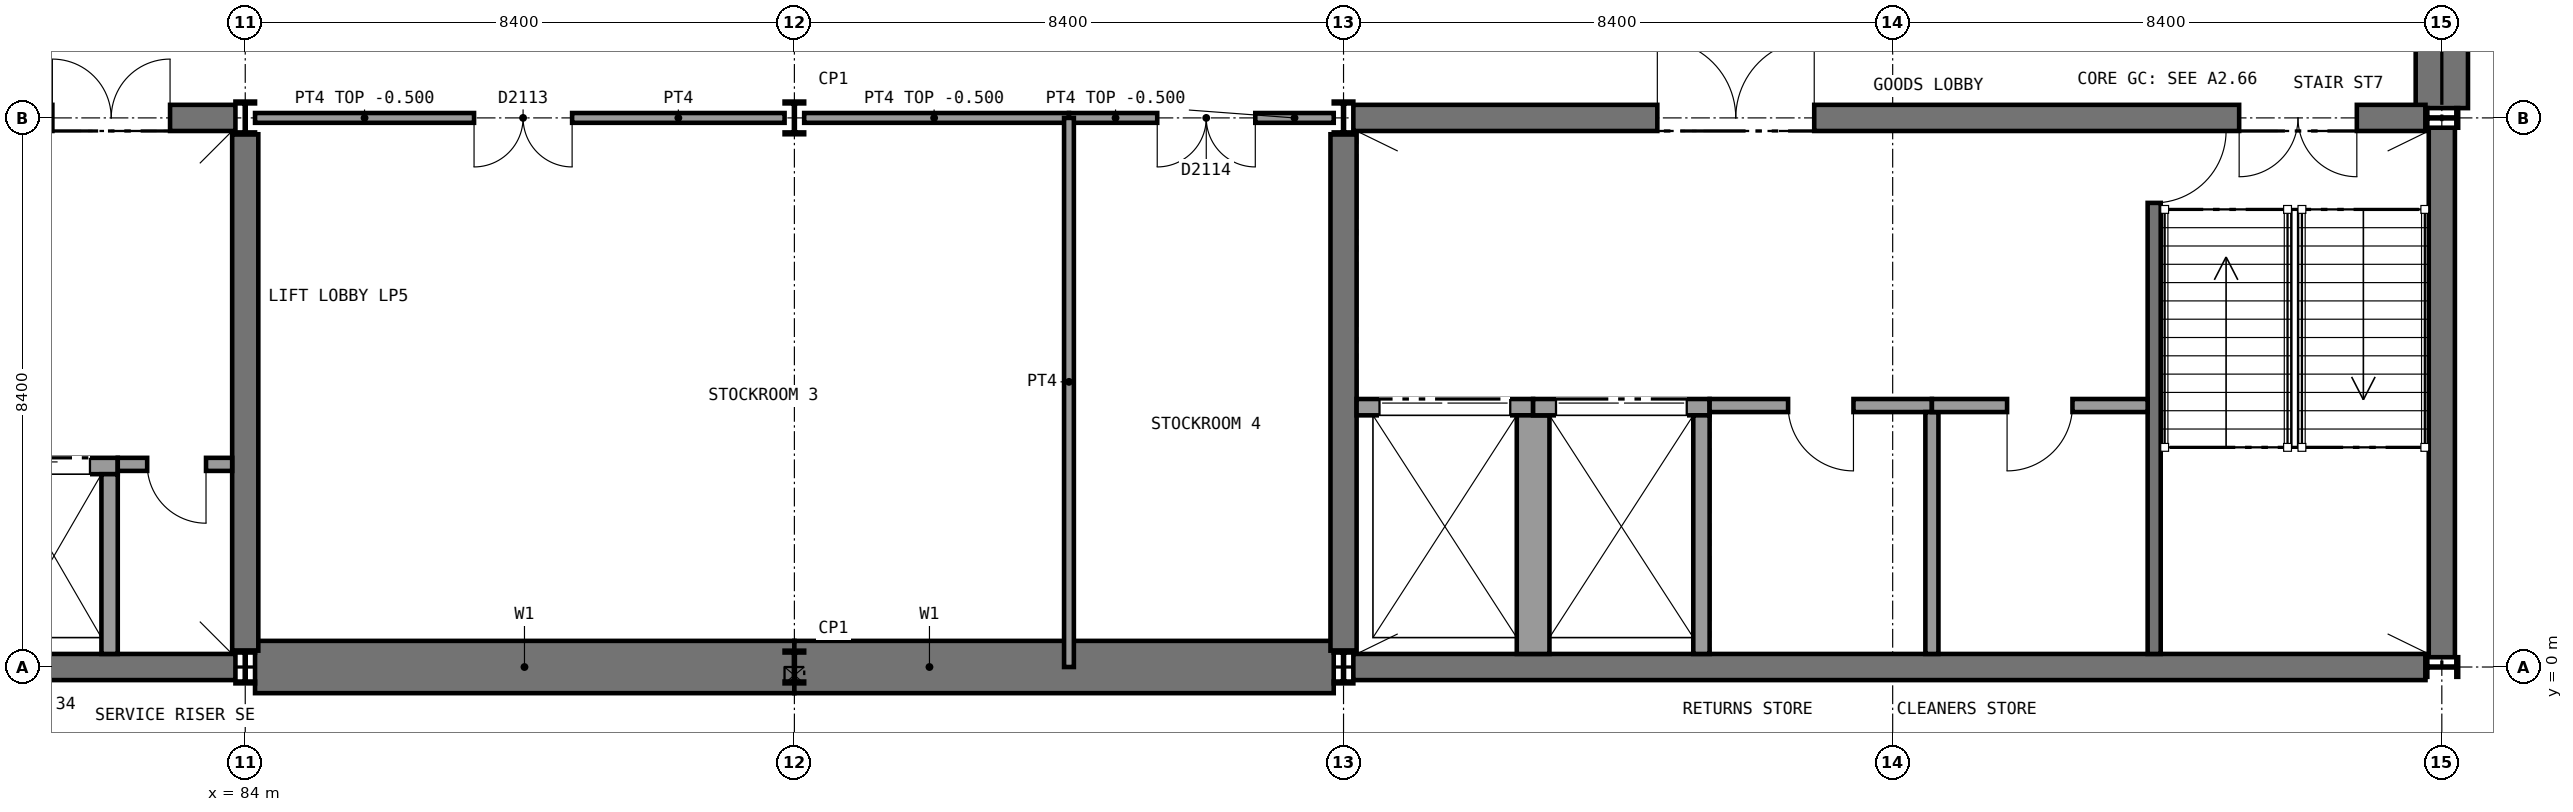
"""IFC4 building model, lengths in metres.
Left out: names, types, materials, properties, quantities, classifications, styles, units other than length and angle.
Written with IfcOpenShell. Run it as: python <this file> out.ifc"""

import sys

from ifc_helpers import new_model, si_unit, direction, frame, frame_2d, origin, origin_2d, place, context, subcontext, project, spatial, rectangle, i_section, extrude, element, fill, save


model = new_model("IFC4")
c1 = context("Model", 3, precision=1e-05, world=origin(), true_north=direction((0.0, 1.0)))
c2 = subcontext(c1, "Body", "Model", "MODEL_VIEW")
j1 = project(units=[si_unit("LENGTHUNIT", "METRE"), si_unit("PLANEANGLEUNIT", "RADIAN")], contexts=[c1])
p1 = place(None, origin())
s1 = spatial("IfcSite", under=j1, at=p1, CompositionType="ELEMENT")
p2 = place(p1, origin())
s2 = spatial("IfcBuilding", under=s1, at=p2, CompositionType="ELEMENT")
p3 = place(p2, frame((0.0, 0.0, -4.9)))
s3 = spatial("IfcBuildingStorey", under=s2, at=p3, CompositionType="ELEMENT", Elevation=-4.9)
p4 = place(p3, frame((84.15, 0.0, 0.0), z_axis=(0.0, 0.0, 1.0), x_axis=(1.0, 0.0, 0.0)))
e1 = element("IfcWall", 1, at=p4, inside=s3, PredefinedType="SOLIDWALL", context=c2, shape_type="SweptSolid", body=[
    extrude(rectangle(XDim=8.25, YDim=0.8, at=frame_2d((4.125, 0.0))), origin(), (0.0, 0.0, 1.0), 4.75),
])
p5 = place(p3, frame((92.4, 0.0, 0.0), z_axis=(0.0, 0.0, 1.0), x_axis=(1.0, 0.0, 0.0)))
e2 = element("IfcWall", 2, at=p5, inside=s3, PredefinedType="SOLIDWALL", context=c2, shape_type="SweptSolid", body=[
    extrude(rectangle(XDim=8.25, YDim=0.8, at=frame_2d((4.125, 0.0))), origin(), (0.0, 0.0, 1.0), 4.75),
])
p6 = place(p3, frame((117.6, 8.55, 0.0), z_axis=(0.0, 0.0, 1.0), x_axis=(0.0, 1.0, 0.0)))
e3 = element("IfcWall", 3, at=p6, inside=s3, PredefinedType="SOLIDWALL", context=c2, shape_type="SweptSolid", body=[
    extrude(rectangle(XDim=8.25, YDim=0.8, at=frame_2d((4.125, 0.0))), origin(), (0.0, 0.0, 1.0), 4.6),
])
p7 = place(p3, frame((75.75, 0.0, 0.0), z_axis=(0.0, 0.0, 1.0), x_axis=(1.0, 0.0, 0.0)))
e4 = element("IfcWall", 4, at=p7, inside=s3, PredefinedType="SHEAR", context=c2, shape_type="SweptSolid", body=[
    extrude(rectangle(XDim=8.1, YDim=0.4, at=frame_2d((4.05, 0.0))), origin(), (0.0, 0.0, 1.0), 4.75),
])
p8 = place(p3, frame((75.75, 8.4, 0.0), z_axis=(0.0, 0.0, 1.0), x_axis=(1.0, 0.0, 0.0)))
e5 = element("IfcWall", 5, at=p8, inside=s3, PredefinedType="SHEAR", context=c2, shape_type="SweptSolid", body=[
    extrude(rectangle(XDim=8.1, YDim=0.4, at=frame_2d((4.05, 0.0))), origin(), (0.0, 0.0, 1.0), 4.75),
])
p9 = place(p8, frame((1.15, 0.0, 0.0)))
e6 = element("IfcOpeningElement", 6, at=p9, cuts=e5, PredefinedType="OPENING", context=c2, shape_type="SweptSolid", body=[
    extrude(rectangle(XDim=1.8, YDim=2.1, at=frame_2d((0.9, 1.05))), frame((0.0, 0.21, 0.0), z_axis=(0.0, -1.0, 0.0), x_axis=(1.0, 0.0, 0.0)), (0.0, 0.0, 1.0), 0.42),
])
p10 = place(p8, frame((5.3, 0.0, 0.0)))
e7 = element("IfcOpeningElement", 7, at=p10, cuts=e5, PredefinedType="OPENING", context=c2, shape_type="SweptSolid", body=[
    extrude(rectangle(XDim=1.8, YDim=2.1, at=frame_2d((0.9, 1.05))), frame((0.0, 0.21, 0.0), z_axis=(0.0, -1.0, 0.0), x_axis=(1.0, 0.0, 0.0)), (0.0, 0.0, 1.0), 0.42),
])
p11 = place(p3, frame((84.0, 0.25, 0.0), z_axis=(0.0, 0.0, 1.0), x_axis=(0.0, 1.0, 0.0)))
e8 = element("IfcWall", 8, at=p11, inside=s3, PredefinedType="SHEAR", context=c2, shape_type="SweptSolid", body=[
    extrude(rectangle(XDim=7.9, YDim=0.4, at=frame_2d((3.95, 0.0))), origin(), (0.0, 0.0, 1.0), 4.75),
])
p12 = place(p3, frame((100.95, 0.0, 0.0), z_axis=(0.0, 0.0, 1.0), x_axis=(1.0, 0.0, 0.0)))
e9 = element("IfcWall", 9, at=p12, inside=s3, PredefinedType="SHEAR", context=c2, shape_type="SweptSolid", body=[
    extrude(rectangle(XDim=16.4, YDim=0.4, at=frame_2d((8.2, 0.0))), origin(), (0.0, 0.0, 1.0), 4.75),
])
p13 = place(p3, frame((100.95, 8.4, 0.0), z_axis=(0.0, 0.0, 1.0), x_axis=(1.0, 0.0, 0.0)))
e10 = element("IfcWall", 10, at=p13, inside=s3, PredefinedType="SHEAR", context=c2, shape_type="SweptSolid", body=[
    extrude(rectangle(XDim=16.4, YDim=0.4, at=frame_2d((8.2, 0.0))), origin(), (0.0, 0.0, 1.0), 4.75),
])
p14 = place(p13, frame((13.55, 0.0, 0.0)))
e11 = element("IfcOpeningElement", 11, at=p14, cuts=e10, PredefinedType="OPENING", context=c2, shape_type="SweptSolid", body=[
    extrude(rectangle(XDim=1.8, YDim=2.1, at=frame_2d((0.9, 1.05))), frame((0.0, 0.21, 0.0), z_axis=(0.0, -1.0, 0.0), x_axis=(1.0, 0.0, 0.0)), (0.0, 0.0, 1.0), 0.42),
])
p15 = place(p13, frame((4.65, 0.0, 0.0)))
e12 = element("IfcOpeningElement", 12, at=p15, cuts=e10, PredefinedType="OPENING", context=c2, shape_type="SweptSolid", body=[
    extrude(rectangle(XDim=2.4, YDim=2.4, at=frame_2d((1.2, 1.2))), frame((0.0, 0.21, 0.0), z_axis=(0.0, -1.0, 0.0), x_axis=(1.0, 0.0, 0.0)), (0.0, 0.0, 1.0), 0.42),
])
p16 = place(p3, frame((100.8, 0.25, 0.0), z_axis=(0.0, 0.0, 1.0), x_axis=(0.0, 1.0, 0.0)))
e13 = element("IfcWall", 13, at=p16, inside=s3, PredefinedType="SHEAR", context=c2, shape_type="SweptSolid", body=[
    extrude(rectangle(XDim=7.9, YDim=0.4, at=frame_2d((3.95, 0.0))), origin(), (0.0, 0.0, 1.0), 4.75),
])
p17 = place(p3, frame((117.6, 0.15, 0.0), z_axis=(0.0, 0.0, 1.0), x_axis=(0.0, 1.0, 0.0)))
e14 = element("IfcWall", 14, at=p17, inside=s3, PredefinedType="SHEAR", context=c2, shape_type="SweptSolid", body=[
    extrude(rectangle(XDim=8.1, YDim=0.4, at=frame_2d((4.05, 0.0))), origin(), (0.0, 0.0, 1.0), 4.75),
])
for number, where, z_axis, x_axis in (
    (15, (84.0, 0.0, 0.0), (0.0, 0.0, 1.0), (1.0, 0.0, 0.0)),
    (16, (84.0, 8.4, 0.0), (0.0, 0.0, 1.0), (1.0, 0.0, 0.0)),
    (17, (92.4, 0.0, 0.0), (0.0, 0.0, 1.0), (1.0, 0.0, 0.0)),
    (18, (92.4, 8.4, 0.0), (0.0, 0.0, 1.0), (1.0, 0.0, 0.0)),
    (19, (100.8, 0.0, 0.0), (0.0, 0.0, 1.0), (1.0, 0.0, 0.0)),
    (20, (100.8, 8.4, 0.0), (0.0, 0.0, 1.0), (1.0, 0.0, 0.0)),
    (21, (117.6, 0.0, 0.0), (0.0, 0.0, 1.0), (0.0, 1.0, 0.0)),
    (22, (117.6, 8.4, 0.0), (0.0, 0.0, 1.0), (0.0, 1.0, 0.0)),
):
    element("IfcColumn", number, at=place(p3, frame(where, z_axis=z_axis, x_axis=x_axis)), inside=s3, PredefinedType="COLUMN", context=c2, shape_type="SweptSolid", body=[
        extrude(i_section(OverallWidth=0.3, OverallDepth=0.5, WebThickness=0.014, FlangeThickness=0.028, FilletRadius=0.027, at=origin_2d()), origin(), (0.0, 0.0, 1.0), 4.9),
    ])
p18 = place(p3, frame((84.15, 8.4, 0.0), z_axis=(0.0, 0.0, 1.0), x_axis=(1.0, 0.0, 0.0)))
e23 = element("IfcWall", 23, at=p18, inside=s3, PredefinedType="SOLIDWALL", context=c2, shape_type="SweptSolid", body=[
    extrude(rectangle(XDim=8.1, YDim=0.15, at=frame_2d((4.05, 0.0))), origin(), (0.0, 0.0, 1.0), 4.4),
])
p19 = place(p18, frame((3.35, 0.0, 0.0)))
e24 = element("IfcOpeningElement", 24, at=p19, cuts=e23, PredefinedType="OPENING", context=c2, shape_type="SweptSolid", body=[
    extrude(rectangle(XDim=1.5, YDim=2.1, at=frame_2d((0.75, 1.05))), frame((0.0, 0.085, 0.0), z_axis=(0.0, -1.0, 0.0), x_axis=(1.0, 0.0, 0.0)), (0.0, 0.0, 1.0), 0.17),
])
p20 = place(p3, frame((92.55, 8.4, 0.0), z_axis=(0.0, 0.0, 1.0), x_axis=(1.0, 0.0, 0.0)))
e25 = element("IfcWall", 25, at=p20, inside=s3, PredefinedType="SOLIDWALL", context=c2, shape_type="SweptSolid", body=[
    extrude(rectangle(XDim=4.05, YDim=0.15, at=frame_2d((2.025, 0.0))), origin(), (0.0, 0.0, 1.0), 4.4),
])
p21 = place(p3, frame((96.6, 8.4, 0.0), z_axis=(0.0, 0.0, 1.0), x_axis=(1.0, 0.0, 0.0)))
e26 = element("IfcWall", 26, at=p21, inside=s3, PredefinedType="SOLIDWALL", context=c2, shape_type="SweptSolid", body=[
    extrude(rectangle(XDim=4.05, YDim=0.15, at=frame_2d((2.025, 0.0))), origin(), (0.0, 0.0, 1.0), 4.4),
])
p22 = place(p21, frame((1.35, 0.0, 0.0)))
e27 = element("IfcOpeningElement", 27, at=p22, cuts=e26, PredefinedType="OPENING", context=c2, shape_type="SweptSolid", body=[
    extrude(rectangle(XDim=1.5, YDim=2.1, at=frame_2d((0.75, 1.05))), frame((0.0, 0.085, 0.0), z_axis=(0.0, -1.0, 0.0), x_axis=(1.0, 0.0, 0.0)), (0.0, 0.0, 1.0), 0.17),
])
p23 = place(p3, frame((96.6, 0.0, 0.0), z_axis=(0.0, 0.0, 1.0), x_axis=(0.0, 1.0, 0.0)))
e28 = element("IfcWall", 28, at=p23, inside=s3, PredefinedType="SOLIDWALL", context=c2, shape_type="SweptSolid", body=[
    extrude(rectangle(XDim=8.4, YDim=0.15, at=frame_2d((4.2, 0.0))), origin(), (0.0, 0.0, 1.0), 4.75),
])
p24 = place(p3, frame((80.1, 3.075, 0.0), z_axis=(0.0, 0.0, 1.0), x_axis=(1.0, 0.0, 0.0)))
e29 = element("IfcWall", 29, at=p24, inside=s3, PredefinedType="SOLIDWALL", context=c2, shape_type="SweptSolid", body=[
    extrude(rectangle(XDim=1.95, YDim=0.25, at=frame_2d((0.975, 0.0))), origin(), (0.0, 0.0, 1.0), 4.9),
])
p25 = place(p24, frame((0.425, 0.0, 0.0)))
e30 = element("IfcOpeningElement", 30, at=p25, cuts=e29, PredefinedType="OPENING", context=c2, shape_type="SweptSolid", body=[
    extrude(rectangle(XDim=1.1, YDim=2.1, at=frame_2d((0.55, 1.05))), frame((0.0, 0.135, 0.0), z_axis=(0.0, -1.0, 0.0), x_axis=(1.0, 0.0, 0.0)), (0.0, 0.0, 1.0), 0.27),
])
p26 = place(p3, frame((81.925, 0.2, 0.0), z_axis=(0.0, 0.0, 1.0), x_axis=(0.0, 1.0, 0.0)))
e31 = element("IfcWall", 31, at=p26, inside=s3, PredefinedType="SOLIDWALL", context=c2, shape_type="SweptSolid", body=[
    extrude(rectangle(XDim=2.75, YDim=0.25, at=frame_2d((1.375, 0.0))), origin(), (0.0, 0.0, 1.0), 4.9),
])
p27 = place(p3, frame((82.05, 3.1, 0.0), z_axis=(0.0, 0.0, 1.0), x_axis=(1.0, 0.0, 0.0)))
e32 = element("IfcWall", 32, at=p27, inside=s3, PredefinedType="PARTITIONING", context=c2, shape_type="SweptSolid", body=[
    extrude(rectangle(XDim=1.75, YDim=0.2, at=frame_2d((0.875, 0.0))), origin(), (0.0, 0.0, 1.0), 4.75),
])
p28 = place(p27, frame((0.45, 0.0, 0.0)))
e33 = element("IfcOpeningElement", 33, at=p28, cuts=e32, PredefinedType="OPENING", context=c2, shape_type="SweptSolid", body=[
    extrude(rectangle(XDim=0.9, YDim=2.1, at=frame_2d((0.45, 1.05))), frame((0.0, 0.11, 0.0), z_axis=(0.0, -1.0, 0.0), x_axis=(1.0, 0.0, 0.0)), (0.0, 0.0, 1.0), 0.22),
])
p29 = place(p3, frame((113.2, 0.2, 0.0), z_axis=(0.0, 0.0, 1.0), x_axis=(0.0, 1.0, 0.0)))
e34 = element("IfcWall", 34, at=p29, inside=s3, PredefinedType="SHEAR", context=c2, shape_type="SweptSolid", body=[
    extrude(rectangle(XDim=8.0, YDim=0.2, at=frame_2d((4.0, 0.0))), origin(), (0.0, 0.0, 1.0), 4.75),
])
p30 = place(p29, frame((6.9, 0.0, 0.0)))
e35 = element("IfcOpeningElement", 35, at=p30, cuts=e34, PredefinedType="OPENING", context=c2, shape_type="SweptSolid", body=[
    extrude(rectangle(XDim=1.11, YDim=2.1, at=frame_2d((0.555, 1.05))), frame((0.0, 0.11, 0.0), z_axis=(0.0, -1.0, 0.0), x_axis=(1.0, 0.0, 0.0)), (0.0, 0.0, 1.0), 0.22),
])
p31 = place(p3, frame((101.0, 3.975, 0.0), z_axis=(0.0, 0.0, 1.0), x_axis=(1.0, 0.0, 0.0)))
e36 = element("IfcWall", 36, at=p31, inside=s3, PredefinedType="SOLIDWALL", context=c2, shape_type="SweptSolid", body=[
    extrude(rectangle(XDim=2.7, YDim=0.25, at=frame_2d((1.35, 0.0))), origin(), (0.0, 0.0, 1.0), 4.9),
])
p32 = place(p31, frame((0.35, 0.0, 0.0)))
e37 = element("IfcOpeningElement", 37, at=p32, cuts=e36, PredefinedType="OPENING", context=c2, shape_type="SweptSolid", body=[
    extrude(rectangle(XDim=2.0, YDim=2.2, at=frame_2d((1.0, 1.1))), frame((0.0, 0.135, 0.0), z_axis=(0.0, -1.0, 0.0), x_axis=(1.0, 0.0, 0.0)), (0.0, 0.0, 1.0), 0.27),
])
p33 = place(p3, frame((103.7, 0.2, 0.0), z_axis=(0.0, 0.0, 1.0), x_axis=(0.0, 1.0, 0.0)))
e38 = element("IfcWall", 38, at=p33, inside=s3, PredefinedType="SOLIDWALL", context=c2, shape_type="SweptSolid", body=[
    extrude(rectangle(XDim=3.65, YDim=0.5, at=frame_2d((1.825, 0.0))), origin(), (0.0, 0.0, 1.0), 4.9),
])
p34 = place(p3, frame((103.7, 3.975, 0.0), z_axis=(0.0, 0.0, 1.0), x_axis=(1.0, 0.0, 0.0)))
e39 = element("IfcWall", 39, at=p34, inside=s3, PredefinedType="SOLIDWALL", context=c2, shape_type="SweptSolid", body=[
    extrude(rectangle(XDim=2.7, YDim=0.25, at=frame_2d((1.35, 0.0))), origin(), (0.0, 0.0, 1.0), 4.9),
])
p35 = place(p34, frame((0.35, 0.0, 0.0)))
e40 = element("IfcOpeningElement", 40, at=p35, cuts=e39, PredefinedType="OPENING", context=c2, shape_type="SweptSolid", body=[
    extrude(rectangle(XDim=2.0, YDim=2.2, at=frame_2d((1.0, 1.1))), frame((0.0, 0.135, 0.0), z_axis=(0.0, -1.0, 0.0), x_axis=(1.0, 0.0, 0.0)), (0.0, 0.0, 1.0), 0.27),
])
p36 = place(p3, frame((106.275, 0.2, 0.0), z_axis=(0.0, 0.0, 1.0), x_axis=(0.0, 1.0, 0.0)))
e41 = element("IfcWall", 41, at=p36, inside=s3, PredefinedType="SOLIDWALL", context=c2, shape_type="SweptSolid", body=[
    extrude(rectangle(XDim=3.65, YDim=0.25, at=frame_2d((1.825, 0.0))), origin(), (0.0, 0.0, 1.0), 4.9),
])
p37 = place(p3, frame((106.4, 4.0, 0.0), z_axis=(0.0, 0.0, 1.0), x_axis=(1.0, 0.0, 0.0)))
e42 = element("IfcWall", 42, at=p37, inside=s3, PredefinedType="PARTITIONING", context=c2, shape_type="SweptSolid", body=[
    extrude(rectangle(XDim=3.4, YDim=0.2, at=frame_2d((1.7, 0.0))), origin(), (0.0, 0.0, 1.0), 4.75),
])
p38 = place(p37, frame((1.2, 0.0, 0.0)))
e43 = element("IfcOpeningElement", 43, at=p38, cuts=e42, PredefinedType="OPENING", context=c2, shape_type="SweptSolid", body=[
    extrude(rectangle(XDim=1.0, YDim=2.1, at=frame_2d((0.5, 1.05))), frame((0.0, 0.11, 0.0), z_axis=(0.0, -1.0, 0.0), x_axis=(1.0, 0.0, 0.0)), (0.0, 0.0, 1.0), 0.22),
])
p39 = place(p3, frame((109.8, 0.2, 0.0), z_axis=(0.0, 0.0, 1.0), x_axis=(0.0, 1.0, 0.0)))
e44 = element("IfcWall", 44, at=p39, inside=s3, PredefinedType="PARTITIONING", context=c2, shape_type="SweptSolid", body=[
    extrude(rectangle(XDim=3.7, YDim=0.2, at=frame_2d((1.85, 0.0))), origin(), (0.0, 0.0, 1.0), 4.75),
])
p40 = place(p3, frame((109.8, 4.0, 0.0), z_axis=(0.0, 0.0, 1.0), x_axis=(1.0, 0.0, 0.0)))
e45 = element("IfcWall", 45, at=p40, inside=s3, PredefinedType="PARTITIONING", context=c2, shape_type="SweptSolid", body=[
    extrude(rectangle(XDim=3.3, YDim=0.2, at=frame_2d((1.65, 0.0))), origin(), (0.0, 0.0, 1.0), 4.75),
])
p41 = place(p40, frame((1.15, 0.0, 0.0)))
e46 = element("IfcOpeningElement", 46, at=p41, cuts=e45, PredefinedType="OPENING", context=c2, shape_type="SweptSolid", body=[
    extrude(rectangle(XDim=1.0, YDim=2.1, at=frame_2d((0.5, 1.05))), frame((0.0, 0.11, 0.0), z_axis=(0.0, -1.0, 0.0), x_axis=(1.0, 0.0, 0.0)), (0.0, 0.0, 1.0), 0.22),
])
p42 = place(p19, frame((1.5, 0.0, 0.0), z_axis=(0.0, 0.0, 1.0), x_axis=(-1.0, 0.0, 0.0)))
e47 = element("IfcDoor", 47, at=p42, inside=s3, OperationType="DOUBLE_DOOR_SINGLE_SWING", PredefinedType="DOOR", context=c2, shape_type="SweptSolid", body=[
    extrude(rectangle(XDim=1.5, YDim=2.1, at=frame_2d((0.75, 1.05))), frame((0.0, 0.025, 0.0), z_axis=(0.0, -1.0, 0.0), x_axis=(1.0, 0.0, 0.0)), (0.0, 0.0, 1.0), 0.05),
])
fill(e24, e47)
p43 = place(p22, frame((1.5, 0.0, 0.0), z_axis=(0.0, 0.0, 1.0), x_axis=(-1.0, 0.0, 0.0)))
e48 = element("IfcDoor", 48, at=p43, inside=s3, OperationType="DOUBLE_DOOR_SINGLE_SWING", PredefinedType="DOOR", context=c2, shape_type="SweptSolid", body=[
    extrude(rectangle(XDim=1.5, YDim=2.1, at=frame_2d((0.75, 1.05))), frame((0.0, 0.025, 0.0), z_axis=(0.0, -1.0, 0.0), x_axis=(1.0, 0.0, 0.0)), (0.0, 0.0, 1.0), 0.05),
])
fill(e27, e48)
p44 = place(p25, origin())
e49 = element("IfcDoor", 49, at=p44, inside=s3, OperationType="SLIDING_TO_LEFT", PredefinedType="DOOR", context=c2, shape_type="SweptSolid", body=[
    extrude(rectangle(XDim=1.1, YDim=2.1, at=frame_2d((0.55, 1.05))), frame((0.0, 0.025, 0.0), z_axis=(0.0, -1.0, 0.0), x_axis=(1.0, 0.0, 0.0)), (0.0, 0.0, 1.0), 0.05),
])
fill(e30, e49)
p45 = place(p28, frame((0.9, 0.0, 0.0), z_axis=(0.0, 0.0, 1.0), x_axis=(-1.0, 0.0, 0.0)))
e50 = element("IfcDoor", 50, at=p45, inside=s3, OperationType="SINGLE_SWING_LEFT", PredefinedType="DOOR", context=c2, shape_type="SweptSolid", body=[
    extrude(rectangle(XDim=0.9, YDim=2.1, at=frame_2d((0.45, 1.05))), frame((0.0, 0.025, 0.0), z_axis=(0.0, -1.0, 0.0), x_axis=(1.0, 0.0, 0.0)), (0.0, 0.0, 1.0), 0.05),
])
fill(e33, e50)
p46 = place(p10, origin())
e51 = element("IfcDoor", 51, at=p46, inside=s3, OperationType="DOUBLE_DOOR_SINGLE_SWING", PredefinedType="DOOR", context=c2, shape_type="SweptSolid", body=[
    extrude(rectangle(XDim=1.8, YDim=2.1, at=frame_2d((0.9, 1.05))), frame((0.0, 0.025, 0.0), z_axis=(0.0, -1.0, 0.0), x_axis=(1.0, 0.0, 0.0)), (0.0, 0.0, 1.0), 0.05),
])
fill(e7, e51)
p47 = place(p30, frame((1.1, 0.0, 0.0), z_axis=(0.0, 0.0, 1.0), x_axis=(-1.0, 0.0, 0.0)))
e52 = element("IfcDoor", 52, at=p47, inside=s3, OperationType="SINGLE_SWING_LEFT", PredefinedType="DOOR", context=c2, shape_type="SweptSolid", body=[
    extrude(rectangle(XDim=1.1, YDim=2.1, at=frame_2d((0.55, 1.05))), frame((0.0, 0.025, 0.0), z_axis=(0.0, -1.0, 0.0), x_axis=(1.0, 0.0, 0.0)), (0.0, 0.0, 1.0), 0.05),
])
fill(e35, e52)
p48 = place(p32, origin())
e53 = element("IfcDoor", 53, at=p48, inside=s3, OperationType="DOUBLE_DOOR_SLIDING", PredefinedType="DOOR", context=c2, shape_type="SweptSolid", body=[
    extrude(rectangle(XDim=2.0, YDim=2.2, at=frame_2d((1.0, 1.1))), frame((0.0, 0.025, 0.0), z_axis=(0.0, -1.0, 0.0), x_axis=(1.0, 0.0, 0.0)), (0.0, 0.0, 1.0), 0.05),
])
fill(e37, e53)
p49 = place(p35, origin())
e54 = element("IfcDoor", 54, at=p49, inside=s3, OperationType="DOUBLE_DOOR_SLIDING", PredefinedType="DOOR", context=c2, shape_type="SweptSolid", body=[
    extrude(rectangle(XDim=2.0, YDim=2.2, at=frame_2d((1.0, 1.1))), frame((0.0, 0.025, 0.0), z_axis=(0.0, -1.0, 0.0), x_axis=(1.0, 0.0, 0.0)), (0.0, 0.0, 1.0), 0.05),
])
fill(e40, e54)
p50 = place(p38, frame((1.0, 0.0, 0.0), z_axis=(0.0, 0.0, 1.0), x_axis=(-1.0, 0.0, 0.0)))
e55 = element("IfcDoor", 55, at=p50, inside=s3, OperationType="SINGLE_SWING_LEFT", PredefinedType="DOOR", context=c2, shape_type="SweptSolid", body=[
    extrude(rectangle(XDim=1.0, YDim=2.1, at=frame_2d((0.5, 1.05))), frame((0.0, 0.025, 0.0), z_axis=(0.0, -1.0, 0.0), x_axis=(1.0, 0.0, 0.0)), (0.0, 0.0, 1.0), 0.05),
])
fill(e43, e55)
p51 = place(p41, frame((1.0, 0.0, 0.0), z_axis=(0.0, 0.0, 1.0), x_axis=(-1.0, 0.0, 0.0)))
e56 = element("IfcDoor", 56, at=p51, inside=s3, OperationType="SINGLE_SWING_RIGHT", PredefinedType="DOOR", context=c2, shape_type="SweptSolid", body=[
    extrude(rectangle(XDim=1.0, YDim=2.1, at=frame_2d((0.5, 1.05))), frame((0.0, 0.025, 0.0), z_axis=(0.0, -1.0, 0.0), x_axis=(1.0, 0.0, 0.0)), (0.0, 0.0, 1.0), 0.05),
])
fill(e46, e56)
p52 = place(p14, frame((1.8, 0.0, 0.0), z_axis=(0.0, 0.0, 1.0), x_axis=(-1.0, 0.0, 0.0)))
e57 = element("IfcDoor", 57, at=p52, inside=s3, OperationType="DOUBLE_DOOR_SINGLE_SWING", PredefinedType="DOOR", context=c2, shape_type="SweptSolid", body=[
    extrude(rectangle(XDim=1.8, YDim=2.1, at=frame_2d((0.9, 1.05))), frame((0.0, 0.025, 0.0), z_axis=(0.0, -1.0, 0.0), x_axis=(1.0, 0.0, 0.0)), (0.0, 0.0, 1.0), 0.05),
])
fill(e11, e57)
p53 = place(p15, origin())
e58 = element("IfcDoor", 58, at=p53, inside=s3, OperationType="DOUBLE_DOOR_SINGLE_SWING", PredefinedType="DOOR", context=c2, shape_type="SweptSolid", body=[
    extrude(rectangle(XDim=2.4, YDim=2.4, at=frame_2d((1.2, 1.2))), frame((0.0, 0.025, 0.0), z_axis=(0.0, -1.0, 0.0), x_axis=(1.0, 0.0, 0.0)), (0.0, 0.0, 1.0), 0.05),
])
fill(e12, e58)
save(model, sys.argv[1])
